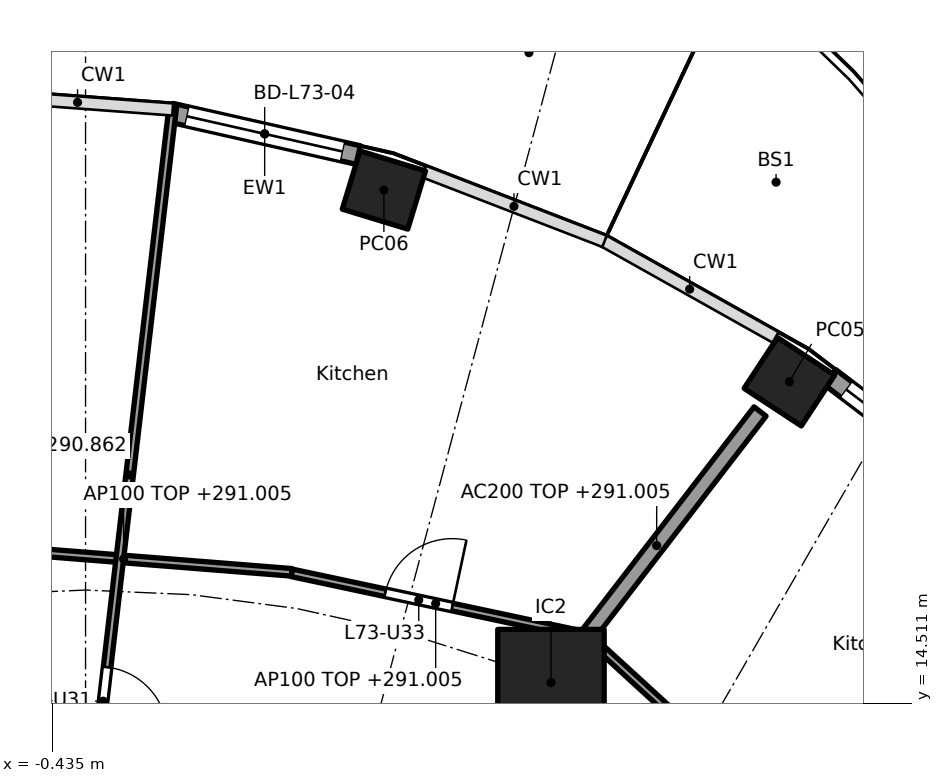
"""IFC4 building model, lengths in metres.
Left out: names, types, materials, properties, quantities, classifications, styles, units other than length and angle.
Written with IfcOpenShell. Run it as: python <this file> out.ifc"""

import sys

from ifc_helpers import new_model, si_unit, direction, frame, frame_2d, origin, origin_2d, place, context, subcontext, project, spatial, rectangle, hollow_rectangle, extrude, element, fill, save


model = new_model("IFC4")
c1 = context("Model", 3, precision=1e-05, world=origin(), true_north=direction((0.0, 1.0)))
c2 = subcontext(c1, "Body", "Model", "MODEL_VIEW")
j1 = project(units=[si_unit("LENGTHUNIT", "METRE"), si_unit("PLANEANGLEUNIT", "RADIAN")], contexts=[c1])
p1 = place(None, origin())
s1 = spatial("IfcSite", under=j1, at=p1, CompositionType="ELEMENT")
p2 = place(p1, origin())
s2 = spatial("IfcBuilding", under=s1, at=p2, CompositionType="ELEMENT")
p3 = place(p2, frame((0.0, 0.0, 288.1)))
s3 = spatial("IfcBuildingStorey", under=s2, at=p3, CompositionType="ELEMENT", Elevation=288.1)
for number, where, z_axis, x_axis in (
    (1, (9.26, 18.741, 0.0), (0.0, 0.0, 1.0), (-0.836, 0.549, 0.0)),
    (2, (3.925, 21.262, 0.0), (0.0, 0.0, 1.0), (-0.957, 0.292, 0.0)),
):
    element("IfcColumn", number, at=place(p3, frame(where, z_axis=z_axis, x_axis=x_axis)), inside=s3, PredefinedType="COLUMN", context=c2, shape_type="SweptSolid", body=[
        extrude(hollow_rectangle(XDim=0.9, YDim=0.8, WallThickness=0.028, at=origin_2d()), origin(), (0.0, 0.0, 1.0), 3.7),
    ])
p4 = place(p3, frame((6.123, 14.782, 0.0), z_axis=(0.0, 0.0, 1.0), x_axis=(1.0, 0.0, 0.0)))
e3 = element("IfcColumn", 3, at=p4, inside=s3, PredefinedType="COLUMN", context=c2, shape_type="SweptSolid", body=[
    extrude(rectangle(XDim=1.4, YDim=1.4, at=origin_2d()), origin(), (0.0, 0.0, 1.0), 3.7),
])
p5 = place(p3, frame((9.792, 18.802, 0.0), z_axis=(0.0, 0.0, 1.0), x_axis=(0.796010739377, -0.605282498339, 0.0)))
e4 = element("IfcWall", 4, at=p5, inside=s3, PredefinedType="SOLIDWALL", context=c2, shape_type="SweptSolid", body=[
    extrude(rectangle(XDim=2.641, YDim=0.25, at=frame_2d((1.32, 0.0))), origin(), (0.0, 0.0, 1.0), 3.44),
])
p6 = place(p5, frame((0.27, 0.0, 0.0)))
e5 = element("IfcOpeningElement", 5, at=p6, cuts=e4, PredefinedType="OPENING", context=c2, shape_type="SweptSolid", body=[
    extrude(rectangle(XDim=2.1, YDim=2.4, at=frame_2d((1.05, 1.2))), frame((0.0, 0.135, 0.0), z_axis=(0.0, -1.0, 0.0), x_axis=(1.0, 0.0, 0.0)), (0.0, 0.0, 1.0), 0.27),
])
p7 = place(p3, frame((1.125, 22.28, 0.0), z_axis=(0.0, 0.0, 1.0), x_axis=(0.97531487046, -0.22081871175, 0.0)))
e6 = element("IfcWall", 6, at=p7, inside=s3, PredefinedType="SOLIDWALL", context=c2, shape_type="SweptSolid", body=[
    extrude(rectangle(XDim=2.525, YDim=0.25, at=frame_2d((1.263, 0.0))), origin(), (0.0, 0.0, 1.0), 3.44),
])
p8 = place(p7, frame((0.213, 0.0, 0.0)))
e7 = element("IfcOpeningElement", 7, at=p8, cuts=e6, PredefinedType="OPENING", context=c2, shape_type="SweptSolid", body=[
    extrude(rectangle(XDim=2.1, YDim=2.4, at=frame_2d((1.05, 1.2))), frame((0.0, 0.135, 0.0), z_axis=(0.0, -1.0, 0.0), x_axis=(1.0, 0.0, 0.0)), (0.0, 0.0, 1.0), 0.27),
])
p9 = place(p3, frame((5.243, 12.657, 0.0), z_axis=(0.0, 0.0, 1.0), x_axis=(0.382691608661, 0.923876145736, 0.0)))
e8 = element("IfcWall", 8, at=p9, inside=s3, PredefinedType="PARTITIONING", context=c2, shape_type="SweptSolid", body=[
    extrude(rectangle(XDim=2.2, YDim=0.2, at=frame_2d((1.1, 0.0))), origin(), (0.0, 0.0, 1.0), 3.44),
])
p10 = place(p3, frame((6.154, 14.822, 0.0), z_axis=(0.0, 0.0, 1.0), x_axis=(0.610687612043, 0.791871606068, 0.0)))
e9 = element("IfcWall", 9, at=p10, inside=s3, PredefinedType="PARTITIONING", context=c2, shape_type="SweptSolid", body=[
    extrude(rectangle(XDim=4.455, YDim=0.2, at=frame_2d((2.228, 0.0))), origin(), (0.0, 0.0, 1.0), 2.905),
])
p11 = place(p3, frame((10.972, 11.398, 0.0), z_axis=(0.0, 0.0, 1.0), x_axis=(-0.737830272434, 0.674986288069, 0.0)))
e10 = element("IfcWall", 10, at=p11, inside=s3, PredefinedType="PARTITIONING", context=c2, shape_type="SweptSolid", body=[
    extrude(rectangle(XDim=5.827, YDim=0.1, at=frame_2d((2.914, 0.0))), origin(), (0.0, 0.0, 1.0), 2.905),
])
p12 = place(p11, frame((1.019, 0.0, 0.0)))
e11 = element("IfcOpeningElement", 11, at=p12, cuts=e10, PredefinedType="OPENING", context=c2, shape_type="SweptSolid", body=[
    extrude(rectangle(XDim=0.9, YDim=2.1, at=frame_2d((0.45, 1.05))), frame((0.0, 0.06, 0.0), z_axis=(0.0, -1.0, 0.0), x_axis=(1.0, 0.0, 0.0)), (0.0, 0.0, 1.0), 0.12),
])
p13 = place(p3, frame((6.5, 15.419, 0.0), z_axis=(0.0, 0.0, 1.0), x_axis=(-0.978053492557, 0.208353943321, 0.0)))
e12 = element("IfcWall", 12, at=p13, inside=s3, PredefinedType="PARTITIONING", context=c2, shape_type="SweptSolid", body=[
    extrude(rectangle(XDim=3.874, YDim=0.1, at=frame_2d((1.937, 0.0))), origin(), (0.0, 0.0, 1.0), 2.905),
])
p14 = place(p13, frame((1.714, 0.0, 0.0)))
e13 = element("IfcOpeningElement", 13, at=p14, cuts=e12, PredefinedType="OPENING", context=c2, shape_type="SweptSolid", body=[
    extrude(rectangle(XDim=0.9, YDim=2.1, at=frame_2d((0.45, 1.05))), frame((0.0, 0.06, 0.0), z_axis=(0.0, -1.0, 0.0), x_axis=(1.0, 0.0, 0.0)), (0.0, 0.0, 1.0), 0.12),
])
p15 = place(p3, frame((2.713, 16.233, 0.0), z_axis=(0.0, 0.0, 1.0), x_axis=(-0.996870142942, 0.079056423588, 0.0)))
e14 = element("IfcWall", 14, at=p15, inside=s3, PredefinedType="PARTITIONING", context=c2, shape_type="SweptSolid", body=[
    extrude(rectangle(XDim=4.438, YDim=0.1, at=frame_2d((2.219, 0.0))), origin(), (0.0, 0.0, 1.0), 2.905),
])
p16 = place(p3, frame((0.012, 12.664, 0.0), z_axis=(0.0, 0.0, 1.0), x_axis=(0.11636251357, 0.993206808996, 0.0)))
e15 = element("IfcWall", 15, at=p16, inside=s3, PredefinedType="PARTITIONING", context=c2, shape_type="SweptSolid", body=[
    extrude(rectangle(XDim=9.765, YDim=0.1, at=frame_2d((4.882, 0.0))), origin(), (0.0, 0.0, 1.0), 2.762),
])
p17 = place(p16, frame((1.437, 0.0, 0.0)))
e16 = element("IfcOpeningElement", 16, at=p17, cuts=e15, PredefinedType="OPENING", context=c2, shape_type="SweptSolid", body=[
    extrude(rectangle(XDim=0.9, YDim=2.1, at=frame_2d((0.45, 1.05))), frame((0.0, 0.06, 0.0), z_axis=(0.0, -1.0, 0.0), x_axis=(1.0, 0.0, 0.0)), (0.0, 0.0, 1.0), 0.12),
])
p18 = place(p6, origin())
e17 = element("IfcDoor", 17, at=p18, inside=s3, OperationType="SLIDING_TO_LEFT", PredefinedType="DOOR", context=c2, shape_type="SweptSolid", body=[
    extrude(rectangle(XDim=2.1, YDim=2.4, at=frame_2d((1.05, 1.2))), frame((0.0, 0.025, 0.0), z_axis=(0.0, -1.0, 0.0), x_axis=(1.0, 0.0, 0.0)), (0.0, 0.0, 1.0), 0.05),
])
fill(e5, e17)
p19 = place(p8, origin())
e18 = element("IfcDoor", 18, at=p19, inside=s3, OperationType="SLIDING_TO_LEFT", PredefinedType="DOOR", context=c2, shape_type="SweptSolid", body=[
    extrude(rectangle(XDim=2.1, YDim=2.4, at=frame_2d((1.05, 1.2))), frame((0.0, 0.025, 0.0), z_axis=(0.0, -1.0, 0.0), x_axis=(1.0, 0.0, 0.0)), (0.0, 0.0, 1.0), 0.05),
])
fill(e7, e18)
p20 = place(p17, frame((0.9, 0.0, 0.0), x_axis=(-1.0, 0.0, 0.0)))
e19 = element("IfcDoor", 19, at=p20, inside=s3, OperationType="SINGLE_SWING_RIGHT", PredefinedType="DOOR", context=c2, shape_type="SweptSolid", body=[
    extrude(rectangle(XDim=0.9, YDim=2.1, at=frame_2d((0.45, 1.05))), frame((0.0, 0.025, 0.0), z_axis=(0.0, -1.0, 0.0), x_axis=(1.0, 0.0, 0.0)), (0.0, 0.0, 1.0), 0.05),
])
fill(e16, e19)
p21 = place(p14, frame((0.9, 0.0, 0.0), x_axis=(-1.0, 0.0, 0.0)))
e20 = element("IfcDoor", 20, at=p21, inside=s3, OperationType="SINGLE_SWING_RIGHT", PredefinedType="DOOR", context=c2, shape_type="SweptSolid", body=[
    extrude(rectangle(XDim=0.9, YDim=2.1, at=frame_2d((0.45, 1.05))), frame((0.0, 0.025, 0.0), z_axis=(0.0, -1.0, 0.0), x_axis=(1.0, 0.0, 0.0)), (0.0, 0.0, 1.0), 0.05),
])
fill(e13, e20)
save(model, sys.argv[1])
